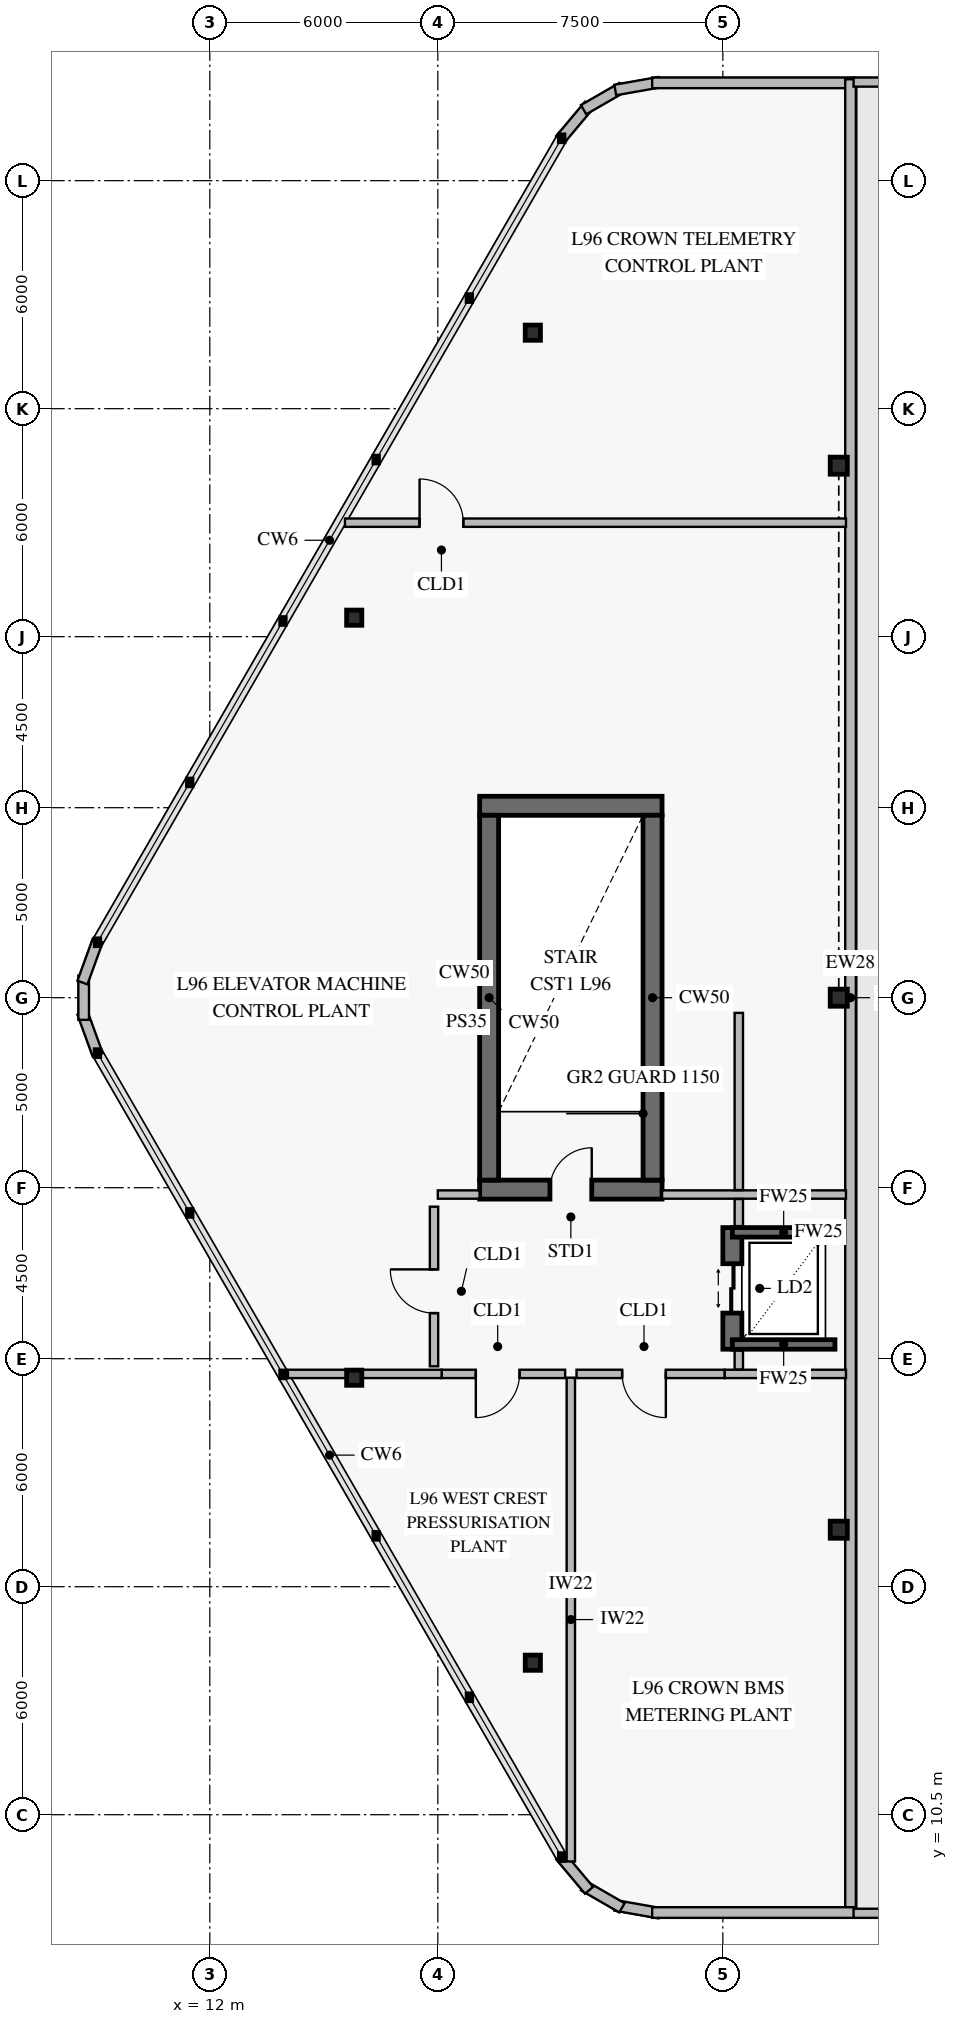
"""IFC4 building model, lengths in metres.
Left out: names, types, materials, properties, quantities, classifications, styles, units other than length and angle.
Written with IfcOpenShell. Run it as: python <this file> out.ifc"""

import sys

from ifc_helpers import new_model, si_unit, direction, frame, frame_2d, origin, origin_2d, place, context, subcontext, project, spatial, rectangle, hollow_rectangle, i_section, extrude, element, fill, save


model = new_model("IFC4")
c1 = context("Model", 3, precision=1e-05, world=origin(), true_north=direction((0.0, 1.0)))
c2 = subcontext(c1, "Body", "Model", "MODEL_VIEW")
j1 = project(units=[si_unit("LENGTHUNIT", "METRE"), si_unit("PLANEANGLEUNIT", "RADIAN")], contexts=[c1])
p1 = place(None, origin())
s1 = spatial("IfcSite", under=j1, at=p1, CompositionType="ELEMENT")
p2 = place(p1, origin())
s2 = spatial("IfcBuilding", under=s1, at=p2, CompositionType="ELEMENT")
p3 = place(p2, frame((0.0, 0.0, 379.0)))
s3 = spatial("IfcBuildingStorey", under=s2, at=p3, CompositionType="ELEMENT", Elevation=379.0)
p4 = place(p3, frame((19.1, 26.95, 0.0), z_axis=(0.0, 0.0, 1.0), x_axis=(1.0, 0.0, 0.0)))
e1 = element("IfcWall", 1, at=p4, inside=s3, PredefinedType="SHEAR", context=c2, shape_type="SweptSolid", body=[
    extrude(rectangle(XDim=4.8, YDim=0.5, at=frame_2d((2.4, 0.0))), origin(), (0.0, 0.0, 1.0), 4.4),
])
p5 = place(p4, frame((1.85, 0.0, 0.0)))
e2 = element("IfcOpeningElement", 2, at=p5, cuts=e1, PredefinedType="OPENING", context=c2, shape_type="SweptSolid", body=[
    extrude(rectangle(XDim=1.1, YDim=2.15, at=frame_2d((0.55, 1.075))), frame((0.0, 0.262, 0.0), z_axis=(0.0, -1.0, 0.0), x_axis=(1.0, 0.0, 0.0)), (0.0, 0.0, 1.0), 0.524),
])
p6 = place(p3, frame((23.9, 37.05, 0.0), z_axis=(0.0, 0.0, 1.0), x_axis=(-1.0, 0.0, 0.0)))
e3 = element("IfcWall", 3, at=p6, inside=s3, PredefinedType="SHEAR", context=c2, shape_type="SweptSolid", body=[
    extrude(rectangle(XDim=4.8, YDim=0.5, at=frame_2d((2.4, 0.0))), origin(), (0.0, 0.0, 1.0), 4.4),
])
for number, where, z_axis, x_axis in (
    (4, (19.35, 27.2, 0.0), (0.0, 0.0, 1.0), (0.0, 1.0, 0.0)),
    (5, (23.65, 36.8, 0.0), (0.0, 0.0, 1.0), (0.0, -1.0, 0.0)),
):
    element("IfcWall", number, at=place(p3, frame(where, z_axis=z_axis, x_axis=x_axis)), inside=s3, PredefinedType="SHEAR", context=c2, shape_type="SweptSolid", body=[
        extrude(rectangle(XDim=9.6, YDim=0.5, at=frame_2d((4.8, 0.0))), origin(), (0.0, 0.0, 1.0), 4.4),
    ])
p7 = place(p3, frame((25.75, 22.75, 0.0), z_axis=(0.0, 0.0, 1.0), x_axis=(0.0, 1.0, 0.0)))
e6 = element("IfcWall", 6, at=p7, inside=s3, PredefinedType="SHEAR", context=c2, shape_type="SweptSolid", body=[
    extrude(rectangle(XDim=3.2, YDim=0.5, at=frame_2d((1.6, 0.0))), origin(), (0.0, 0.0, 1.0), 4.4),
])
p8 = place(p7, frame((0.95, 0.0, 0.0)))
e7 = element("IfcOpeningElement", 7, at=p8, cuts=e6, PredefinedType="OPENING", context=c2, shape_type="SweptSolid", body=[
    extrude(rectangle(XDim=1.3, YDim=2.3, at=frame_2d((0.65, 1.15))), frame((0.0, 0.262, 0.0), z_axis=(0.0, -1.0, 0.0), x_axis=(1.0, 0.0, 0.0)), (0.0, 0.0, 1.0), 0.524),
])
for number, where, z_axis, x_axis in (
    (8, (15.8, 22.0, 0.0), (0.0, 0.0, 1.0), (1.0, 0.0, 0.0)),
    (9, (15.8, 42.0, 0.0), (0.0, 0.0, 1.0), (1.0, 0.0, 0.0)),
    (10, (20.5, 14.5, 0.0), (0.0, 0.0, 1.0), (1.0, 0.0, 0.0)),
    (11, (20.5, 49.5, 0.0), (0.0, 0.0, 1.0), (1.0, 0.0, 0.0)),
):
    element("IfcColumn", number, at=place(p3, frame(where, z_axis=z_axis, x_axis=x_axis)), inside=s3, PredefinedType="COLUMN", context=c2, shape_type="SweptSolid", body=[
        extrude(i_section(OverallWidth=0.4, OverallDepth=0.4, WebThickness=0.013, FlangeThickness=0.021, at=origin_2d()), origin(), (0.0, 0.0, 1.0), 4.1),
    ])
for number, where, z_axis, x_axis in (
    (12, (28.55, 18.0, 0.0), (0.0, 0.0, 1.0), (1.0, 0.0, 0.0)),
    (13, (28.55, 32.0, 0.0), (0.0, 0.0, 1.0), (1.0, 0.0, 0.0)),
    (14, (28.55, 46.0, 0.0), (0.0, 0.0, 1.0), (1.0, 0.0, 0.0)),
):
    element("IfcColumn", number, at=place(p3, frame(where, z_axis=z_axis, x_axis=x_axis)), inside=s3, PredefinedType="PILASTER", context=c2, shape_type="SweptSolid", body=[
        extrude(hollow_rectangle(XDim=0.45, YDim=0.45, WallThickness=0.022, at=origin_2d()), origin(), (0.0, 0.0, 1.0), 4.1),
    ])
p9 = place(p3, frame((23.829, 7.909, 0.0), z_axis=(0.0, 0.0, 1.0), x_axis=(-0.984798162481, 0.173702559495, 0.0)))
e15 = element("IfcWall", 15, at=p9, inside=s3, PredefinedType="SOLIDWALL", context=c2, shape_type="SweptSolid", body=[
    extrude(rectangle(XDim=1.178, YDim=0.28, at=frame_2d((0.589, 0.0))), origin(), (0.0, 0.0, 1.0), 4.05),
])
p10 = place(p3, frame((22.845, 8.05, 0.0), z_axis=(0.0, 0.0, 1.0), x_axis=(-0.865951785477, 0.500127488975, 0.0)))
e16 = element("IfcWall", 16, at=p10, inside=s3, PredefinedType="SOLIDWALL", context=c2, shape_type="SweptSolid", body=[
    extrude(rectangle(XDim=1.165, YDim=0.28, at=frame_2d((0.583, 0.0))), origin(), (0.0, 0.0, 1.0), 4.05),
])
for number, where, z_axis, x_axis in (
    (17, (21.979, 8.512, 0.0), (0.0, 0.0, 1.0), (-0.643, 0.766, 0.0)),
    (18, (9.052, 30.495, 0.0), (0.0, 0.0, 1.0), (-0.342, 0.94, 0.0)),
):
    element("IfcWall", number, at=place(p3, frame(where, z_axis=z_axis, x_axis=x_axis)), inside=s3, PredefinedType="SOLIDWALL", context=c2, shape_type="SweptSolid", body=[
        extrude(rectangle(XDim=1.178, YDim=0.28, at=frame_2d((0.589, 0.0))), origin(), (0.0, 0.0, 1.0), 4.05),
    ])
p11 = place(p3, frame((8.681, 31.417, 0.0), z_axis=(0.0, 0.0, 1.0), x_axis=(0.0, 1.0, 0.0)))
e19 = element("IfcWall", 19, at=p11, inside=s3, PredefinedType="SOLIDWALL", context=c2, shape_type="SweptSolid", body=[
    extrude(rectangle(XDim=1.165, YDim=0.28, at=frame_2d((0.583, 0.0))), origin(), (0.0, 0.0, 1.0), 4.05),
])
for number, where, z_axis, x_axis in (
    (20, (8.649, 32.398, 0.0), (0.0, 0.0, 1.0), (0.342, 0.94, 0.0)),
    (21, (21.222, 54.586, 0.0), (0.0, 0.0, 1.0), (0.643, 0.766, 0.0)),
):
    element("IfcWall", number, at=place(p3, frame(where, z_axis=z_axis, x_axis=x_axis)), inside=s3, PredefinedType="SOLIDWALL", context=c2, shape_type="SweptSolid", body=[
        extrude(rectangle(XDim=1.178, YDim=0.28, at=frame_2d((0.589, 0.0))), origin(), (0.0, 0.0, 1.0), 4.05),
    ])
p12 = place(p3, frame((21.836, 55.367, 0.0), z_axis=(0.0, 0.0, 1.0), x_axis=(0.865951785477, 0.500127488975, 0.0)))
e22 = element("IfcWall", 22, at=p12, inside=s3, PredefinedType="SOLIDWALL", context=c2, shape_type="SweptSolid", body=[
    extrude(rectangle(XDim=1.165, YDim=0.28, at=frame_2d((0.583, 0.0))), origin(), (0.0, 0.0, 1.0), 4.05),
])
p13 = place(p3, frame((22.669, 55.886, 0.0), z_axis=(0.0, 0.0, 1.0), x_axis=(0.984798162481, 0.173702559495, 0.0)))
e23 = element("IfcWall", 23, at=p13, inside=s3, PredefinedType="SOLIDWALL", context=c2, shape_type="SweptSolid", body=[
    extrude(rectangle(XDim=1.178, YDim=0.28, at=frame_2d((0.589, 0.0))), origin(), (0.0, 0.0, 1.0), 4.05),
])
p14 = place(p3, frame((23.64, 56.074, 0.0), z_axis=(0.0, 0.0, 1.0), x_axis=(1.0, 0.0, 0.0)))
e24 = element("IfcWall", 24, at=p14, inside=s3, PredefinedType="SOLIDWALL", context=c2, shape_type="SweptSolid", body=[
    extrude(rectangle(XDim=5.315, YDim=0.28, at=frame_2d((2.657, 0.0))), origin(), (0.0, 0.0, 1.0), 4.05),
])
p15 = place(p3, frame((28.86, 56.169, 0.0), z_axis=(0.0, 0.0, 1.0), x_axis=(0.0, -1.0, 0.0)))
e25 = element("IfcWall", 25, at=p15, inside=s3, PredefinedType="SOLIDWALL", context=c2, shape_type="SweptSolid", body=[
    extrude(rectangle(XDim=48.338, YDim=0.28, at=frame_2d((24.169, 0.0))), origin(), (0.0, 0.0, 1.0), 4.05),
])
p16 = place(p3, frame((28.955, 7.926, 0.0), z_axis=(0.0, 0.0, 1.0), x_axis=(-1.0, 0.0, 0.0)))
e26 = element("IfcWall", 26, at=p16, inside=s3, PredefinedType="SOLIDWALL", context=c2, shape_type="SweptSolid", body=[
    extrude(rectangle(XDim=5.315, YDim=0.28, at=frame_2d((2.657, 0.0))), origin(), (0.0, 0.0, 1.0), 4.05),
])
for number, where, z_axis, x_axis in (
    (27, (43.06, 7.906, 0.0), (0.0, 0.0, 1.0), (-1.0, 0.0, 0.0)),
    (28, (28.94, 56.094, 0.0), (0.0, 0.0, 1.0), (1.0, 0.0, 0.0)),
):
    element("IfcWall", number, at=place(p3, frame(where, z_axis=z_axis, x_axis=x_axis)), inside=s3, PredefinedType="PARAPET", context=c2, shape_type="SweptSolid", body=[
        extrude(rectangle(XDim=14.12, YDim=0.24, at=frame_2d((7.06, 0.0))), origin(), (0.0, 0.0, 1.0), 1.2),
    ])
for number, where, z_axis, x_axis in (
    (29, (25.75, 25.825, 0.0), (0.0, 0.0, 1.0), (1.0, 0.0, 0.0)),
    (30, (25.75, 22.875, 0.0), (0.0, 0.0, 1.0), (1.0, 0.0, 0.0)),
):
    element("IfcWall", number, at=place(p3, frame(where, z_axis=z_axis, x_axis=x_axis)), inside=s3, PredefinedType="SOLIDWALL", context=c2, shape_type="SweptSolid", body=[
        extrude(rectangle(XDim=2.7, YDim=0.25, at=frame_2d((1.35, 0.0))), origin(), (0.0, 0.0, 1.0), 4.4),
    ])
p17 = place(p3, frame((15.557, 44.5, 0.0), z_axis=(0.0, 0.0, 1.0), x_axis=(1.0, 0.0, 0.0)))
e31 = element("IfcWall", 31, at=p17, inside=s3, PredefinedType="PARTITIONING", context=c2, shape_type="SweptSolid", body=[
    extrude(rectangle(XDim=13.183, YDim=0.22, at=frame_2d((6.591, 0.0))), origin(), (0.0, 0.0, 1.0), 3.8),
])
p18 = place(p17, frame((1.963, 0.0, 0.0)))
e32 = element("IfcOpeningElement", 32, at=p18, cuts=e31, PredefinedType="OPENING", context=c2, shape_type="SweptSolid", body=[
    extrude(rectangle(XDim=1.15, YDim=2.2, at=frame_2d((0.575, 1.1))), frame((0.0, 0.122, 0.0), z_axis=(0.0, -1.0, 0.0), x_axis=(1.0, 0.0, 0.0)), (0.0, 0.0, 1.0), 0.244),
])
p19 = place(p3, frame((18.1, 22.1, 0.0), z_axis=(0.0, 0.0, 1.0), x_axis=(1.0, 0.0, 0.0)))
e33 = element("IfcWall", 33, at=p19, inside=s3, PredefinedType="PARTITIONING", context=c2, shape_type="SweptSolid", body=[
    extrude(rectangle(XDim=3.25, YDim=0.22, at=frame_2d((1.625, 0.0))), origin(), (0.0, 0.0, 1.0), 4.05),
])
p20 = place(p19, frame((0.9, 0.0, 0.0)))
e34 = element("IfcOpeningElement", 34, at=p20, cuts=e33, PredefinedType="OPENING", context=c2, shape_type="SweptSolid", body=[
    extrude(rectangle(XDim=1.15, YDim=2.2, at=frame_2d((0.575, 1.1))), frame((0.0, 0.122, 0.0), z_axis=(0.0, -1.0, 0.0), x_axis=(1.0, 0.0, 0.0)), (0.0, 0.0, 1.0), 0.244),
])
p21 = place(p3, frame((21.65, 22.1, 0.0), z_axis=(0.0, 0.0, 1.0), x_axis=(1.0, 0.0, 0.0)))
e35 = element("IfcWall", 35, at=p21, inside=s3, PredefinedType="PARTITIONING", context=c2, shape_type="SweptSolid", body=[
    extrude(rectangle(XDim=3.9, YDim=0.22, at=frame_2d((1.95, 0.0))), origin(), (0.0, 0.0, 1.0), 4.05),
])
p22 = place(p21, frame((1.2, 0.0, 0.0)))
e36 = element("IfcOpeningElement", 36, at=p22, cuts=e35, PredefinedType="OPENING", context=c2, shape_type="SweptSolid", body=[
    extrude(rectangle(XDim=1.15, YDim=2.2, at=frame_2d((0.575, 1.1))), frame((0.0, 0.122, 0.0), z_axis=(0.0, -1.0, 0.0), x_axis=(1.0, 0.0, 0.0)), (0.0, 0.0, 1.0), 0.244),
])
p23 = place(p3, frame((17.9, 22.3, 0.0), z_axis=(0.0, 0.0, 1.0), x_axis=(0.0, 1.0, 0.0)))
e37 = element("IfcWall", 37, at=p23, inside=s3, PredefinedType="PARTITIONING", context=c2, shape_type="SweptSolid", body=[
    extrude(rectangle(XDim=4.2, YDim=0.22, at=frame_2d((2.1, 0.0))), origin(), (0.0, 0.0, 1.0), 4.05),
])
p24 = place(p23, frame((1.4, 0.0, 0.0)))
e38 = element("IfcOpeningElement", 38, at=p24, cuts=e37, PredefinedType="OPENING", context=c2, shape_type="SweptSolid", body=[
    extrude(rectangle(XDim=1.15, YDim=2.2, at=frame_2d((0.575, 1.1))), frame((0.0, 0.122, 0.0), z_axis=(0.0, -1.0, 0.0), x_axis=(1.0, 0.0, 0.0)), (0.0, 0.0, 1.0), 0.244),
])
p25 = place(p3, frame((14.056, 22.1, 0.0), z_axis=(0.0, 0.0, 1.0), x_axis=(1.0, 0.0, 0.0)))
e39 = element("IfcWall", 39, at=p25, inside=s3, PredefinedType="PARTITIONING", context=c2, shape_type="SweptSolid", body=[
    extrude(rectangle(XDim=4.044, YDim=0.22, at=frame_2d((2.022, 0.0))), origin(), (0.0, 0.0, 1.0), 4.05),
])
p26 = place(p3, frame((25.55, 22.1, 0.0), z_axis=(0.0, 0.0, 1.0), x_axis=(1.0, 0.0, 0.0)))
e40 = element("IfcWall", 40, at=p26, inside=s3, PredefinedType="PARTITIONING", context=c2, shape_type="SweptSolid", body=[
    extrude(rectangle(XDim=3.19, YDim=0.22, at=frame_2d((1.595, 0.0))), origin(), (0.0, 0.0, 1.0), 3.8),
])
p27 = place(p3, frame((21.5, 9.27, 0.0), z_axis=(0.0, 0.0, 1.0), x_axis=(0.0, 1.0, 0.0)))
e41 = element("IfcWall", 41, at=p27, inside=s3, PredefinedType="PARTITIONING", context=c2, shape_type="SweptSolid", body=[
    extrude(rectangle(XDim=12.73, YDim=0.22, at=frame_2d((6.365, 0.0))), origin(), (0.0, 0.0, 1.0), 3.8),
])
p28 = place(p3, frame((28.74, 26.82, 0.0), z_axis=(0.0, 0.0, 1.0), x_axis=(-1.0, 0.0, 0.0)))
e42 = element("IfcWall", 42, at=p28, inside=s3, PredefinedType="PARTITIONING", context=c2, shape_type="SweptSolid", body=[
    extrude(rectangle(XDim=4.84, YDim=0.22, at=frame_2d((2.42, 0.0))), origin(), (0.0, 0.0, 1.0), 3.8),
])
p29 = place(p3, frame((19.1, 26.82, 0.0), z_axis=(0.0, 0.0, 1.0), x_axis=(-1.0, 0.0, 0.0)))
e43 = element("IfcWall", 43, at=p29, inside=s3, PredefinedType="PARTITIONING", context=c2, shape_type="SweptSolid", body=[
    extrude(rectangle(XDim=1.1, YDim=0.22, at=frame_2d((0.55, 0.0))), origin(), (0.0, 0.0, 1.0), 4.05),
])
p30 = place(p3, frame((25.92, 25.989, 0.0), z_axis=(0.0, 0.0, 1.0), x_axis=(0.0, 1.0, 0.0)))
e44 = element("IfcWall", 44, at=p30, inside=s3, PredefinedType="PARTITIONING", context=c2, shape_type="SweptSolid", body=[
    extrude(rectangle(XDim=0.713, YDim=0.22, at=frame_2d((0.356, 0.0))), origin(), (0.0, 0.0, 1.0), 4.05),
])
p31 = place(p3, frame((25.92, 26.938, 0.0), z_axis=(0.0, 0.0, 1.0), x_axis=(0.0, 1.0, 0.0)))
e45 = element("IfcWall", 45, at=p31, inside=s3, PredefinedType="PARTITIONING", context=c2, shape_type="SweptSolid", body=[
    extrude(rectangle(XDim=4.662, YDim=0.22, at=frame_2d((2.331, 0.0))), origin(), (0.0, 0.0, 1.0), 4.05),
])
p32 = place(p3, frame((25.92, 22.218, 0.0), z_axis=(0.0, 0.0, 1.0), x_axis=(0.0, 1.0, 0.0)))
e46 = element("IfcWall", 46, at=p32, inside=s3, PredefinedType="PARTITIONING", context=c2, shape_type="SweptSolid", body=[
    extrude(rectangle(XDim=0.493, YDim=0.22, at=frame_2d((0.247, 0.0))), origin(), (0.0, 0.0, 1.0), 4.05),
])
p33 = place(p8, origin())
e47 = element("IfcDoor", 47, at=p33, inside=s3, OperationType="DOUBLE_DOOR_SLIDING", PredefinedType="DOOR", context=c2, shape_type="SweptSolid", body=[
    extrude(rectangle(XDim=1.3, YDim=2.3, at=frame_2d((0.65, 1.15))), frame((0.0, 0.025, 0.0), z_axis=(0.0, -1.0, 0.0), x_axis=(1.0, 0.0, 0.0)), (0.0, 0.0, 1.0), 0.05),
])
fill(e7, e47)
p34 = place(p5, origin())
e48 = element("IfcDoor", 48, at=p34, inside=s3, OperationType="SINGLE_SWING_RIGHT", PredefinedType="USERDEFINED", context=c2, shape_type="SweptSolid", body=[
    extrude(rectangle(XDim=1.1, YDim=2.15, at=frame_2d((0.55, 1.075))), frame((0.0, 0.025, 0.0), z_axis=(0.0, -1.0, 0.0), x_axis=(1.0, 0.0, 0.0)), (0.0, 0.0, 1.0), 0.05),
])
fill(e2, e48)
p35 = place(p18, origin())
e49 = element("IfcDoor", 49, at=p35, inside=s3, OperationType="SINGLE_SWING_LEFT", PredefinedType="DOOR", context=c2, shape_type="SweptSolid", body=[
    extrude(rectangle(XDim=1.15, YDim=2.2, at=frame_2d((0.575, 1.1))), frame((0.0, 0.025, 0.0), z_axis=(0.0, -1.0, 0.0), x_axis=(1.0, 0.0, 0.0)), (0.0, 0.0, 1.0), 0.05),
])
fill(e32, e49)
p36 = place(p20, frame((1.15, 0.0, 0.0), z_axis=(0.0, 0.0, 1.0), x_axis=(-1.0, 0.0, 0.0)))
e50 = element("IfcDoor", 50, at=p36, inside=s3, OperationType="SINGLE_SWING_RIGHT", PredefinedType="DOOR", context=c2, shape_type="SweptSolid", body=[
    extrude(rectangle(XDim=1.15, YDim=2.2, at=frame_2d((0.575, 1.1))), frame((0.0, 0.025, 0.0), z_axis=(0.0, -1.0, 0.0), x_axis=(1.0, 0.0, 0.0)), (0.0, 0.0, 1.0), 0.05),
])
fill(e34, e50)
p37 = place(p22, frame((1.15, 0.0, 0.0), z_axis=(0.0, 0.0, 1.0), x_axis=(-1.0, 0.0, 0.0)))
e51 = element("IfcDoor", 51, at=p37, inside=s3, OperationType="SINGLE_SWING_LEFT", PredefinedType="DOOR", context=c2, shape_type="SweptSolid", body=[
    extrude(rectangle(XDim=1.15, YDim=2.2, at=frame_2d((0.575, 1.1))), frame((0.0, 0.025, 0.0), z_axis=(0.0, -1.0, 0.0), x_axis=(1.0, 0.0, 0.0)), (0.0, 0.0, 1.0), 0.05),
])
fill(e36, e51)
p38 = place(p24, origin())
e52 = element("IfcDoor", 52, at=p38, inside=s3, OperationType="SINGLE_SWING_RIGHT", PredefinedType="DOOR", context=c2, shape_type="SweptSolid", body=[
    extrude(rectangle(XDim=1.15, YDim=2.2, at=frame_2d((0.575, 1.1))), frame((0.0, 0.025, 0.0), z_axis=(0.0, -1.0, 0.0), x_axis=(1.0, 0.0, 0.0)), (0.0, 0.0, 1.0), 0.05),
])
fill(e38, e52)
save(model, sys.argv[1])
